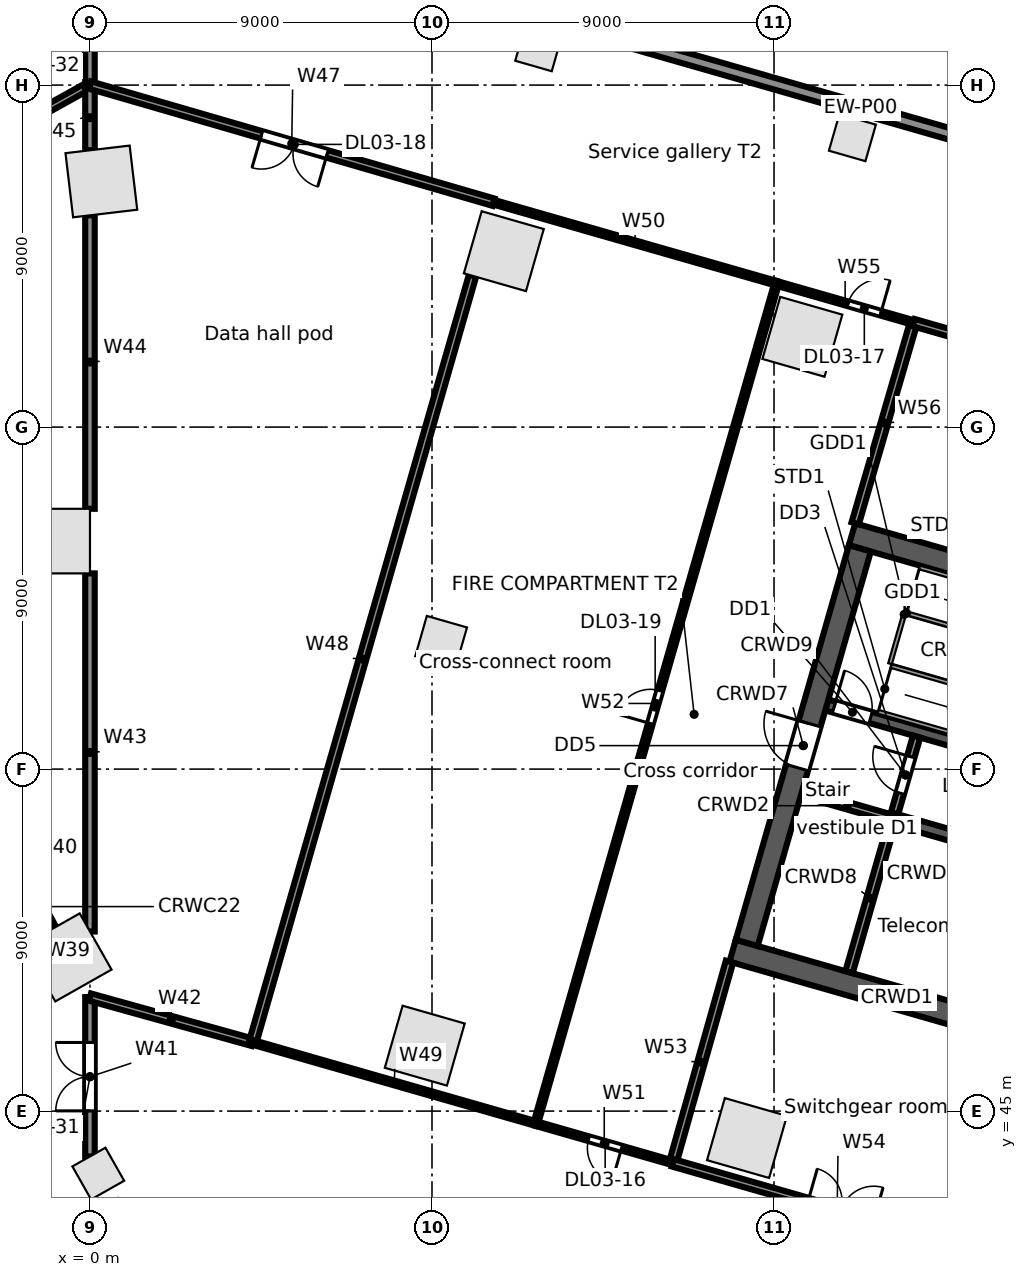
"""IFC4 building model, lengths in metres.
Left out: names, types, materials, properties, quantities, classifications, styles, units other than length and angle.
Written with IfcOpenShell. Run it as: python <this file> out.ifc"""

import sys

from ifc_helpers import new_model, si_unit, direction, frame, frame_2d, origin, origin_2d, place, context, subcontext, project, spatial, rectangle, extrude, element, fill, save


model = new_model("IFC4")
c1 = context("Model", 3, precision=1e-05, world=origin(), true_north=direction((0.0, 1.0)))
c2 = subcontext(c1, "Body", "Model", "MODEL_VIEW")
j1 = project(units=[si_unit("LENGTHUNIT", "METRE"), si_unit("PLANEANGLEUNIT", "RADIAN")], contexts=[c1])
p1 = place(None, origin())
s1 = spatial("IfcSite", under=j1, at=p1, CompositionType="ELEMENT")
p2 = place(p1, origin())
s2 = spatial("IfcBuilding", under=s1, at=p2, CompositionType="ELEMENT")
p3 = place(p2, frame((0.0, 0.0, 21.5)))
s3 = spatial("IfcBuildingStorey", under=s2, at=p3, CompositionType="ELEMENT", Elevation=21.5)
for number, where, z_axis, x_axis in (
    (1, (18.746, 65.376, 0.0), (0.0, 0.0, 1.0), (-0.961, 0.276, 0.0)),
    (2, (10.89, 67.629, 0.0), (0.0, 0.0, 1.0), (-0.961, 0.276, 0.0)),
    (3, (0.3, 69.464, 0.0), (0.0, 0.0, 1.0), (-0.993, -0.118, 0.0)),
    (4, (-0.591, 49.044, 0.0), (0.0, 0.0, 1.0), (0.87, 0.492, 0.0)),
    (5, (8.81, 46.722, 0.0), (0.0, 0.0, 1.0), (0.961, -0.276, 0.0)),
    (6, (17.288, 44.291, 0.0), (0.0, 0.0, 1.0), (0.961, -0.276, 0.0)),
    (7, (-0.85, 60.0, 0.0), (0.0, 0.0, 1.0), (0.0, 1.0, 0.0)),
):
    element("IfcColumn", number, at=place(p3, frame(where, z_axis=z_axis, x_axis=x_axis)), inside=s3, PredefinedType="COLUMN", context=c2, shape_type="SweptSolid", body=[
        extrude(rectangle(XDim=1.7, YDim=1.7, at=origin_2d()), origin(), (0.0, 0.0, 1.0), 5.0),
    ])
for number, where, z_axis, x_axis in (
    (8, (20.062, 70.616, 0.0), (0.0, 0.0, 1.0), (-0.961, 0.276, 0.0)),
    (9, (11.809, 72.983, 0.0), (0.0, 0.0, 1.0), (-0.961, 0.276, 0.0)),
    (10, (0.219, 43.355, 0.0), (0.0, 0.0, 1.0), (0.87, 0.492, 0.0)),
):
    element("IfcColumn", number, at=place(p3, frame(where, z_axis=z_axis, x_axis=x_axis)), inside=s3, PredefinedType="COLUMN", context=c2, shape_type="SweptSolid", body=[
        extrude(rectangle(XDim=1.0, YDim=1.0, at=origin_2d()), origin(), (0.0, 0.0, 1.0), 4.68),
    ])
p4 = place(p3, frame((9.241, 57.35, 0.0), z_axis=(0.0, 0.0, 1.0), x_axis=(0.961261695938, -0.275637355817, 0.0)))
e11 = element("IfcColumn", 11, at=p4, inside=s3, PredefinedType="COLUMN", context=c2, shape_type="SweptSolid", body=[
    extrude(rectangle(XDim=1.1, YDim=1.1, at=origin_2d()), origin(), (0.0, 0.0, 1.0), 5.0),
])
p5 = place(p3, frame((3.747, 76.127, 0.0), z_axis=(0.0, 0.0, 1.0), x_axis=(0.961261546185, -0.275637878067, 0.0)))
e12 = element("IfcWall", 12, at=p5, inside=s3, PredefinedType="STANDARD", context=c2, shape_type="SweptSolid", body=[
    extrude(rectangle(XDim=34.395, YDim=0.3, at=frame_2d((17.197, 0.0))), origin(), (0.0, 0.0, 1.0), 4.68),
])
p6 = place(p3, frame((16.911, 49.221, 0.0), z_axis=(0.0, 0.0, 1.0), x_axis=(0.96126248289, -0.275634611374, 0.0)))
e13 = element("IfcWall", 13, at=p6, inside=s3, PredefinedType="SOLIDWALL", context=c2, shape_type="SweptSolid", body=[
    extrude(rectangle(XDim=9.0, YDim=0.6, at=frame_2d((4.5, 0.0))), origin(), (0.0, 0.0, 1.0), 4.68),
])
p7 = place(p3, frame((18.728, 53.382, 0.0), z_axis=(0.0, 0.0, 1.0), x_axis=(0.961247070632, -0.275688355216, 0.0)))
e14 = element("IfcWall", 14, at=p7, inside=s3, PredefinedType="SOLIDWALL", context=c2, shape_type="SweptSolid", body=[
    extrude(rectangle(XDim=2.5, YDim=0.2, at=frame_2d((1.25, 0.0))), origin(), (0.0, 0.0, 1.0), 4.68),
])
p8 = place(p3, frame((21.131, 52.692, 0.0), z_axis=(0.0, 0.0, 1.0), x_axis=(0.961271492568, -0.275603188616, 0.0)))
e15 = element("IfcWall", 15, at=p8, inside=s3, PredefinedType="SOLIDWALL", context=c2, shape_type="SweptSolid", body=[
    extrude(rectangle(XDim=5.3, YDim=0.3, at=frame_2d((2.65, 0.0))), origin(), (0.0, 0.0, 1.0), 4.68),
])
p9 = place(p8, frame((2.35, 0.0, 0.0)))
e16 = element("IfcOpeningElement", 16, at=p9, cuts=e15, PredefinedType="OPENING", context=c2, shape_type="SweptSolid", body=[
    extrude(rectangle(XDim=0.9, YDim=2.1, at=frame_2d((0.45, 1.05))), frame((0.0, 0.16, 0.0), z_axis=(0.0, -1.0, 0.0), x_axis=(1.0, 0.0, 0.0)), (0.0, 0.0, 1.0), 0.32),
])
p10 = place(p3, frame((19.389, 55.689, 0.0), z_axis=(0.0, 0.0, 1.0), x_axis=(0.961261397636, -0.275638396117, 0.0)))
e17 = element("IfcWall", 17, at=p10, inside=s3, PredefinedType="SOLIDWALL", context=c2, shape_type="SweptSolid", body=[
    extrude(rectangle(XDim=7.1, YDim=0.3, at=frame_2d((3.55, 0.0))), origin(), (0.0, 0.0, 1.0), 4.68),
])
p11 = place(p10, frame((0.2, 0.0, 0.0)))
e18 = element("IfcOpeningElement", 18, at=p11, cuts=e17, PredefinedType="OPENING", context=c2, shape_type="SweptSolid", body=[
    extrude(rectangle(XDim=1.0, YDim=2.1, at=frame_2d((0.5, 1.05))), frame((0.0, 0.16, 0.0), z_axis=(0.0, -1.0, 0.0), x_axis=(1.0, 0.0, 0.0)), (0.0, 0.0, 1.0), 0.32),
])
p12 = place(p3, frame((20.053, 60.18, 0.0), z_axis=(0.0, 0.0, 1.0), x_axis=(0.96126248289, -0.275634611374, 0.0)))
e19 = element("IfcWall", 19, at=p12, inside=s3, PredefinedType="SOLIDWALL", context=c2, shape_type="SweptSolid", body=[
    extrude(rectangle(XDim=9.0, YDim=0.6, at=frame_2d((4.5, 0.0))), origin(), (0.0, 0.0, 1.0), 4.68),
])
p13 = place(p3, frame((17.282, 49.427, 0.0), z_axis=(0.0, 0.0, 1.0), x_axis=(0.275631631629, 0.961263337304, 0.0)))
e20 = element("IfcWall", 20, at=p13, inside=s3, PredefinedType="SOLIDWALL", context=c2, shape_type="SweptSolid", body=[
    extrude(rectangle(XDim=10.8, YDim=0.6, at=frame_2d((5.4, 0.0))), origin(), (0.0, 0.0, 1.0), 4.68),
])
p14 = place(p13, frame((4.8, 0.0, 0.0)))
e21 = element("IfcOpeningElement", 21, at=p14, cuts=e20, PredefinedType="OPENING", context=c2, shape_type="SweptSolid", body=[
    extrude(rectangle(XDim=1.2, YDim=2.1, at=frame_2d((0.6, 1.05))), frame((0.0, 0.31, 0.0), z_axis=(0.0, -1.0, 0.0), x_axis=(1.0, 0.0, 0.0)), (0.0, 0.0, 1.0), 0.62),
])
p15 = place(p3, frame((19.973, 48.655, 0.0), z_axis=(0.0, 0.0, 1.0), x_axis=(0.275668441653, 0.961252781674, 0.0)))
e22 = element("IfcWall", 22, at=p15, inside=s3, PredefinedType="SOLIDWALL", context=c2, shape_type="SweptSolid", body=[
    extrude(rectangle(XDim=4.05, YDim=0.2, at=frame_2d((2.025, 0.0))), origin(), (0.0, 0.0, 1.0), 4.68),
])
p16 = place(p3, frame((21.172, 52.837, 0.0), z_axis=(0.0, 0.0, 1.0), x_axis=(0.275657676022, 0.961255868981, 0.0)))
e23 = element("IfcWall", 23, at=p16, inside=s3, PredefinedType="PARTITIONING", context=c2, shape_type="SweptSolid", body=[
    extrude(rectangle(XDim=2.1, YDim=0.2, at=frame_2d((1.05, 0.0))), origin(), (0.0, 0.0, 1.0), 4.68),
])
p17 = place(p16, frame((0.55, 0.0, 0.0)))
e24 = element("IfcOpeningElement", 24, at=p17, cuts=e23, PredefinedType="OPENING", context=c2, shape_type="SweptSolid", body=[
    extrude(rectangle(XDim=1.0, YDim=2.1, at=frame_2d((0.5, 1.05))), frame((0.0, 0.11, 0.0), z_axis=(0.0, -1.0, 0.0), x_axis=(1.0, 0.0, 0.0)), (0.0, 0.0, 1.0), 0.22),
])
p18 = place(p3, frame((-6.337, 68.478, 0.0), z_axis=(0.0, 0.0, 1.0), x_axis=(0.87407148623, 0.485797320864, 0.0)))
e25 = element("IfcWall", 25, at=p18, inside=s3, PredefinedType="PARTITIONING", context=c2, shape_type="SweptSolid", body=[
    extrude(rectangle(XDim=7.25, YDim=0.2, at=frame_2d((3.625, 0.0))), origin(), (0.0, 0.0, 1.0), 3.96),
])
p19 = place(p18, frame((2.7, 0.0, 0.0)))
e26 = element("IfcOpeningElement", 26, at=p19, cuts=e25, PredefinedType="OPENING", context=c2, shape_type="SweptSolid", body=[
    extrude(rectangle(XDim=1.8, YDim=2.1, at=frame_2d((0.9, 1.05))), frame((0.0, 0.11, 0.0), z_axis=(0.0, -1.0, 0.0), x_axis=(1.0, 0.0, 0.0)), (0.0, 0.0, 1.0), 0.22),
])
p20 = place(p3, frame((-1.883, 51.467, 0.0), z_axis=(0.0, 0.0, 1.0), x_axis=(0.477162952876, -0.878814836244, 0.0)))
e27 = element("IfcWall", 27, at=p20, inside=s3, PredefinedType="PARTITIONING", context=c2, shape_type="SweptSolid", body=[
    extrude(rectangle(XDim=1.895, YDim=0.2, at=frame_2d((0.947, 0.0))), origin(), (0.0, 0.0, 1.0), 4.68),
])
p21 = place(p3, frame((0.0, 43.806, 0.0), z_axis=(0.0, 0.0, 1.0), x_axis=(0.0, 1.0, 0.0)))
e28 = element("IfcWall", 28, at=p21, inside=s3, PredefinedType="PARTITIONING", context=c2, shape_type="SweptSolid", body=[
    extrude(rectangle(XDim=4.194, YDim=0.25, at=frame_2d((2.097, 0.0))), origin(), (0.0, 0.0, 1.0), 3.742),
])
p22 = place(p21, frame((1.2, 0.0, 0.0)))
e29 = element("IfcOpeningElement", 29, at=p22, cuts=e28, PredefinedType="OPENING", context=c2, shape_type="SweptSolid", body=[
    extrude(rectangle(XDim=1.8, YDim=2.1, at=frame_2d((0.9, 1.05))), frame((0.0, 0.135, 0.0), z_axis=(0.0, -1.0, 0.0), x_axis=(1.0, 0.0, 0.0)), (0.0, 0.0, 1.0), 0.27),
])
p23 = place(p3, frame((0.0, 48.0, 0.0), z_axis=(0.0, 0.0, 1.0), x_axis=(0.963400508162, -0.268066150181, 0.0)))
e30 = element("IfcWall", 30, at=p23, inside=s3, PredefinedType="PARTITIONING", context=c2, shape_type="SweptSolid", body=[
    extrude(rectangle(XDim=4.443, YDim=0.2, at=frame_2d((2.221, 0.0))), origin(), (0.0, 0.0, 1.0), 4.68),
])
p24 = place(p3, frame((0.0, 49.726, 0.0), z_axis=(0.0, 0.0, 1.0), x_axis=(0.0, 1.0, 0.0)))
e31 = element("IfcWall", 31, at=p24, inside=s3, PredefinedType="PARTITIONING", context=c2, shape_type="SweptSolid", body=[
    extrude(rectangle(XDim=9.424, YDim=0.25, at=frame_2d((4.712, 0.0))), origin(), (0.0, 0.0, 1.0), 4.68),
])
p25 = place(p3, frame((0.0, 60.85, 0.0), z_axis=(0.0, 0.0, 1.0), x_axis=(0.0, 1.0, 0.0)))
e32 = element("IfcWall", 32, at=p25, inside=s3, PredefinedType="PARTITIONING", context=c2, shape_type="SweptSolid", body=[
    extrude(rectangle(XDim=7.723, YDim=0.25, at=frame_2d((3.861, 0.0))), origin(), (0.0, 0.0, 1.0), 3.952),
])
p26 = place(p3, frame((0.0, 70.285, 0.0), z_axis=(0.0, 0.0, 1.0), x_axis=(0.0, 1.0, 0.0)))
e33 = element("IfcWall", 33, at=p26, inside=s3, PredefinedType="PARTITIONING", context=c2, shape_type="SweptSolid", body=[
    extrude(rectangle(XDim=1.715, YDim=0.25, at=frame_2d((0.857, 0.0))), origin(), (0.0, 0.0, 1.0), 4.68),
])
p27 = place(p3, frame((0.0, 72.0, 0.0), z_axis=(0.0, 0.0, 1.0), x_axis=(0.0, 1.0, 0.0)))
e34 = element("IfcWall", 34, at=p27, inside=s3, PredefinedType="PARTITIONING", context=c2, shape_type="SweptSolid", body=[
    extrude(rectangle(XDim=3.521, YDim=0.25, at=frame_2d((1.76, 0.0))), origin(), (0.0, 0.0, 1.0), 3.96),
])
p28 = place(p27, frame((0.95, 0.0, 0.0)))
e35 = element("IfcOpeningElement", 35, at=p28, cuts=e34, PredefinedType="OPENING", context=c2, shape_type="SweptSolid", body=[
    extrude(rectangle(XDim=1.8, YDim=2.1, at=frame_2d((0.9, 1.05))), frame((0.0, 0.135, 0.0), z_axis=(0.0, -1.0, 0.0), x_axis=(1.0, 0.0, 0.0)), (0.0, 0.0, 1.0), 0.27),
])
p29 = place(p3, frame((0.0, 72.0, 0.0), z_axis=(0.0, 0.0, 1.0), x_axis=(0.960375968852, -0.278707729443, 0.0)))
e36 = element("IfcWall", 36, at=p29, inside=s3, PredefinedType="PARTITIONING", context=c2, shape_type="SweptSolid", body=[
    extrude(rectangle(XDim=11.058, YDim=0.2, at=frame_2d((5.529, 0.0))), origin(), (0.0, 0.0, 1.0), 3.742),
])
p30 = place(p29, frame((4.7, 0.0, 0.0)))
e37 = element("IfcOpeningElement", 37, at=p30, cuts=e36, PredefinedType="OPENING", context=c2, shape_type="SweptSolid", body=[
    extrude(rectangle(XDim=1.8, YDim=2.1, at=frame_2d((0.9, 1.05))), frame((0.0, 0.11, 0.0), z_axis=(0.0, -1.0, 0.0), x_axis=(1.0, 0.0, 0.0)), (0.0, 0.0, 1.0), 0.22),
])
p31 = place(p3, frame((4.28, 46.809, 0.0), z_axis=(0.0, 0.0, 1.0), x_axis=(0.27566906052, 0.961252604195, 0.0)))
e38 = element("IfcWall", 38, at=p31, inside=s3, PredefinedType="PARTITIONING", context=c2, shape_type="SweptSolid", body=[
    extrude(rectangle(XDim=20.985, YDim=0.2, at=frame_2d((10.493, 0.0))), origin(), (0.0, 0.0, 1.0), 3.742),
])
p32 = place(p3, frame((4.28, 46.809, 0.0), z_axis=(0.0, 0.0, 1.0), x_axis=(0.961270337968, -0.275607215693, 0.0)))
e39 = element("IfcWall", 39, at=p32, inside=s3, PredefinedType="PARTITIONING", context=c2, shape_type="SweptSolid", body=[
    extrude(rectangle(XDim=7.75, YDim=0.125, at=frame_2d((3.875, 0.0))), origin(), (0.0, 0.0, 1.0), 4.048),
])
p33 = place(p3, frame((10.62, 68.918, 0.0), z_axis=(0.0, 0.0, 1.0), x_axis=(0.961260764876, -0.275640602796, 0.0)))
e40 = element("IfcWall", 40, at=p33, inside=s3, PredefinedType="PARTITIONING", context=c2, shape_type="SweptSolid", body=[
    extrude(rectangle(XDim=7.749, YDim=0.125, at=frame_2d((3.875, 0.0))), origin(), (0.0, 0.0, 1.0), 3.742),
])
p34 = place(p3, frame((11.73, 44.673, 0.0), z_axis=(0.0, 0.0, 1.0), x_axis=(0.961228613303, -0.275752702557, 0.0)))
e41 = element("IfcWall", 41, at=p34, inside=s3, PredefinedType="PARTITIONING", context=c2, shape_type="SweptSolid", body=[
    extrude(rectangle(XDim=3.75, YDim=0.125, at=frame_2d((1.875, 0.0))), origin(), (0.0, 0.0, 1.0), 4.68),
])
p35 = place(p34, frame((1.45, 0.0, 0.0)))
e42 = element("IfcOpeningElement", 42, at=p35, cuts=e41, PredefinedType="OPENING", context=c2, shape_type="SweptSolid", body=[
    extrude(rectangle(XDim=0.9, YDim=2.1, at=frame_2d((0.45, 1.05))), frame((0.0, 0.073, 0.0), z_axis=(0.0, -1.0, 0.0), x_axis=(1.0, 0.0, 0.0)), (0.0, 0.0, 1.0), 0.145),
])
p36 = place(p3, frame((11.73, 44.673, 0.0), z_axis=(0.0, 0.0, 1.0), x_axis=(0.275616869382, 0.961267570093, 0.0)))
e43 = element("IfcWall", 43, at=p36, inside=s3, PredefinedType="PARTITIONING", context=c2, shape_type="SweptSolid", body=[
    extrude(rectangle(XDim=23.0, YDim=0.125, at=frame_2d((11.5, 0.0))), origin(), (0.0, 0.0, 1.0), 3.742),
])
p37 = place(p36, frame((10.95, 0.0, 0.0)))
e44 = element("IfcOpeningElement", 44, at=p37, cuts=e43, PredefinedType="OPENING", context=c2, shape_type="SweptSolid", body=[
    extrude(rectangle(XDim=0.9, YDim=2.1, at=frame_2d((0.45, 1.05))), frame((0.0, 0.073, 0.0), z_axis=(0.0, -1.0, 0.0), x_axis=(1.0, 0.0, 0.0)), (0.0, 0.0, 1.0), 0.145),
])
p38 = place(p3, frame((15.335, 43.639, 0.0), z_axis=(0.0, 0.0, 1.0), x_axis=(0.271407455373, 0.962464541252, 0.0)))
e45 = element("IfcWall", 45, at=p38, inside=s3, PredefinedType="PARTITIONING", context=c2, shape_type="SweptSolid", body=[
    extrude(rectangle(XDim=5.501, YDim=0.2, at=frame_2d((2.75, 0.0))), origin(), (0.0, 0.0, 1.0), 3.96),
])
p39 = place(p3, frame((15.335, 43.639, 0.0), z_axis=(0.0, 0.0, 1.0), x_axis=(0.961281982754, -0.275566597455, 0.0)))
e46 = element("IfcWall", 46, at=p39, inside=s3, PredefinedType="PARTITIONING", context=c2, shape_type="SweptSolid", body=[
    extrude(rectangle(XDim=9.0, YDim=0.2, at=frame_2d((4.5, 0.0))), origin(), (0.0, 0.0, 1.0), 3.748),
])
p40 = place(p39, frame((3.7, 0.0, 0.0)))
e47 = element("IfcOpeningElement", 47, at=p40, cuts=e46, PredefinedType="OPENING", context=c2, shape_type="SweptSolid", body=[
    extrude(rectangle(XDim=1.8, YDim=2.1, at=frame_2d((0.9, 1.05))), frame((0.0, 0.11, 0.0), z_axis=(0.0, -1.0, 0.0), x_axis=(1.0, 0.0, 0.0)), (0.0, 0.0, 1.0), 0.22),
])
p41 = place(p3, frame((18.069, 66.782, 0.0), z_axis=(0.0, 0.0, 1.0), x_axis=(0.961314848061, -0.275451924837, 0.0)))
e48 = element("IfcWall", 48, at=p41, inside=s3, PredefinedType="PARTITIONING", context=c2, shape_type="SweptSolid", body=[
    extrude(rectangle(XDim=3.75, YDim=0.125, at=frame_2d((1.875, 0.0))), origin(), (0.0, 0.0, 1.0), 3.742),
])
p42 = place(p41, frame((1.95, 0.0, 0.0)))
e49 = element("IfcOpeningElement", 49, at=p42, cuts=e48, PredefinedType="OPENING", context=c2, shape_type="SweptSolid", body=[
    extrude(rectangle(XDim=0.9, YDim=2.1, at=frame_2d((0.45, 1.05))), frame((0.0, 0.073, 0.0), z_axis=(0.0, -1.0, 0.0), x_axis=(1.0, 0.0, 0.0)), (0.0, 0.0, 1.0), 0.145),
])
p43 = place(p3, frame((20.136, 60.468, 0.0), z_axis=(0.0, 0.0, 1.0), x_axis=(0.279630121779, 0.96010780384, 0.0)))
e50 = element("IfcWall", 50, at=p43, inside=s3, PredefinedType="PARTITIONING", context=c2, shape_type="SweptSolid", body=[
    extrude(rectangle(XDim=5.5, YDim=0.2, at=frame_2d((2.75, 0.0))), origin(), (0.0, 0.0, 1.0), 3.96),
])
p44 = place(p3, frame((21.674, 65.749, 0.0), z_axis=(0.0, 0.0, 1.0), x_axis=(0.961259417468, -0.275645301662, 0.0)))
e51 = element("IfcWall", 51, at=p44, inside=s3, PredefinedType="PARTITIONING", context=c2, shape_type="SweptSolid", body=[
    extrude(rectangle(XDim=9.0, YDim=0.2, at=frame_2d((4.5, 0.0))), origin(), (0.0, 0.0, 1.0), 3.748),
])
p45 = place(p44, frame((2.7, 0.0, 0.0)))
e52 = element("IfcOpeningElement", 52, at=p45, cuts=e51, PredefinedType="OPENING", context=c2, shape_type="SweptSolid", body=[
    extrude(rectangle(XDim=1.8, YDim=2.1, at=frame_2d((0.9, 1.05))), frame((0.0, 0.11, 0.0), z_axis=(0.0, -1.0, 0.0), x_axis=(1.0, 0.0, 0.0)), (0.0, 0.0, 1.0), 0.22),
])
p46 = place(p11, origin())
e53 = element("IfcDoor", 53, at=p46, inside=s3, OperationType="SINGLE_SWING_LEFT", PredefinedType="DOOR", context=c2, shape_type="SweptSolid", body=[
    extrude(rectangle(XDim=1.0, YDim=2.1, at=frame_2d((0.5, 1.05))), frame((0.0, 0.025, 0.0), z_axis=(0.0, -1.0, 0.0), x_axis=(1.0, 0.0, 0.0)), (0.0, 0.0, 1.0), 0.05),
])
fill(e18, e53)
p47 = place(p17, origin())
e54 = element("IfcDoor", 54, at=p47, inside=s3, OperationType="SINGLE_SWING_RIGHT", PredefinedType="DOOR", context=c2, shape_type="SweptSolid", body=[
    extrude(rectangle(XDim=1.0, YDim=2.1, at=frame_2d((0.5, 1.05))), frame((0.0, 0.025, 0.0), z_axis=(0.0, -1.0, 0.0), x_axis=(1.0, 0.0, 0.0)), (0.0, 0.0, 1.0), 0.05),
])
fill(e24, e54)
p48 = place(p14, origin())
e55 = element("IfcDoor", 55, at=p48, inside=s3, OperationType="SINGLE_SWING_RIGHT", PredefinedType="DOOR", context=c2, shape_type="SweptSolid", body=[
    extrude(rectangle(XDim=1.2, YDim=2.1, at=frame_2d((0.6, 1.05))), frame((0.0, 0.025, 0.0), z_axis=(0.0, -1.0, 0.0), x_axis=(1.0, 0.0, 0.0)), (0.0, 0.0, 1.0), 0.05),
])
fill(e21, e55)
p49 = place(p35, frame((0.9, 0.0, 0.0), z_axis=(0.0, 0.0, 1.0), x_axis=(-1.0, 0.0, 0.0)))
e56 = element("IfcDoor", 56, at=p49, inside=s3, OperationType="SINGLE_SWING_LEFT", PredefinedType="DOOR", context=c2, shape_type="SweptSolid", body=[
    extrude(rectangle(XDim=0.9, YDim=2.1, at=frame_2d((0.45, 1.05))), frame((0.0, 0.025, 0.0), z_axis=(0.0, -1.0, 0.0), x_axis=(1.0, 0.0, 0.0)), (0.0, 0.0, 1.0), 0.05),
])
fill(e42, e56)
p50 = place(p42, origin())
e57 = element("IfcDoor", 57, at=p50, inside=s3, OperationType="SINGLE_SWING_RIGHT", PredefinedType="DOOR", context=c2, shape_type="SweptSolid", body=[
    extrude(rectangle(XDim=0.9, YDim=2.1, at=frame_2d((0.45, 1.05))), frame((0.0, 0.025, 0.0), z_axis=(0.0, -1.0, 0.0), x_axis=(1.0, 0.0, 0.0)), (0.0, 0.0, 1.0), 0.05),
])
fill(e49, e57)
p51 = place(p30, frame((1.8, 0.0, 0.0), z_axis=(0.0, 0.0, 1.0), x_axis=(-1.0, 0.0, 0.0)))
e58 = element("IfcDoor", 58, at=p51, inside=s3, OperationType="DOUBLE_DOOR_SINGLE_SWING", PredefinedType="DOOR", context=c2, shape_type="SweptSolid", body=[
    extrude(rectangle(XDim=1.8, YDim=2.1, at=frame_2d((0.9, 1.05))), frame((0.0, 0.025, 0.0), z_axis=(0.0, -1.0, 0.0), x_axis=(1.0, 0.0, 0.0)), (0.0, 0.0, 1.0), 0.05),
])
fill(e37, e58)
p52 = place(p37, origin())
e59 = element("IfcDoor", 59, at=p52, inside=s3, OperationType="SINGLE_SWING_LEFT", PredefinedType="DOOR", context=c2, shape_type="SweptSolid", body=[
    extrude(rectangle(XDim=0.9, YDim=2.1, at=frame_2d((0.45, 1.05))), frame((0.0, 0.025, 0.0), z_axis=(0.0, -1.0, 0.0), x_axis=(1.0, 0.0, 0.0)), (0.0, 0.0, 1.0), 0.05),
])
fill(e44, e59)
p53 = place(p22, origin())
e60 = element("IfcDoor", 60, at=p53, inside=s3, OperationType="DOUBLE_DOOR_SINGLE_SWING", PredefinedType="DOOR", context=c2, shape_type="SweptSolid", body=[
    extrude(rectangle(XDim=1.8, YDim=2.1, at=frame_2d((0.9, 1.05))), frame((0.0, 0.025, 0.0), z_axis=(0.0, -1.0, 0.0), x_axis=(1.0, 0.0, 0.0)), (0.0, 0.0, 1.0), 0.05),
])
fill(e29, e60)
save(model, sys.argv[1])
